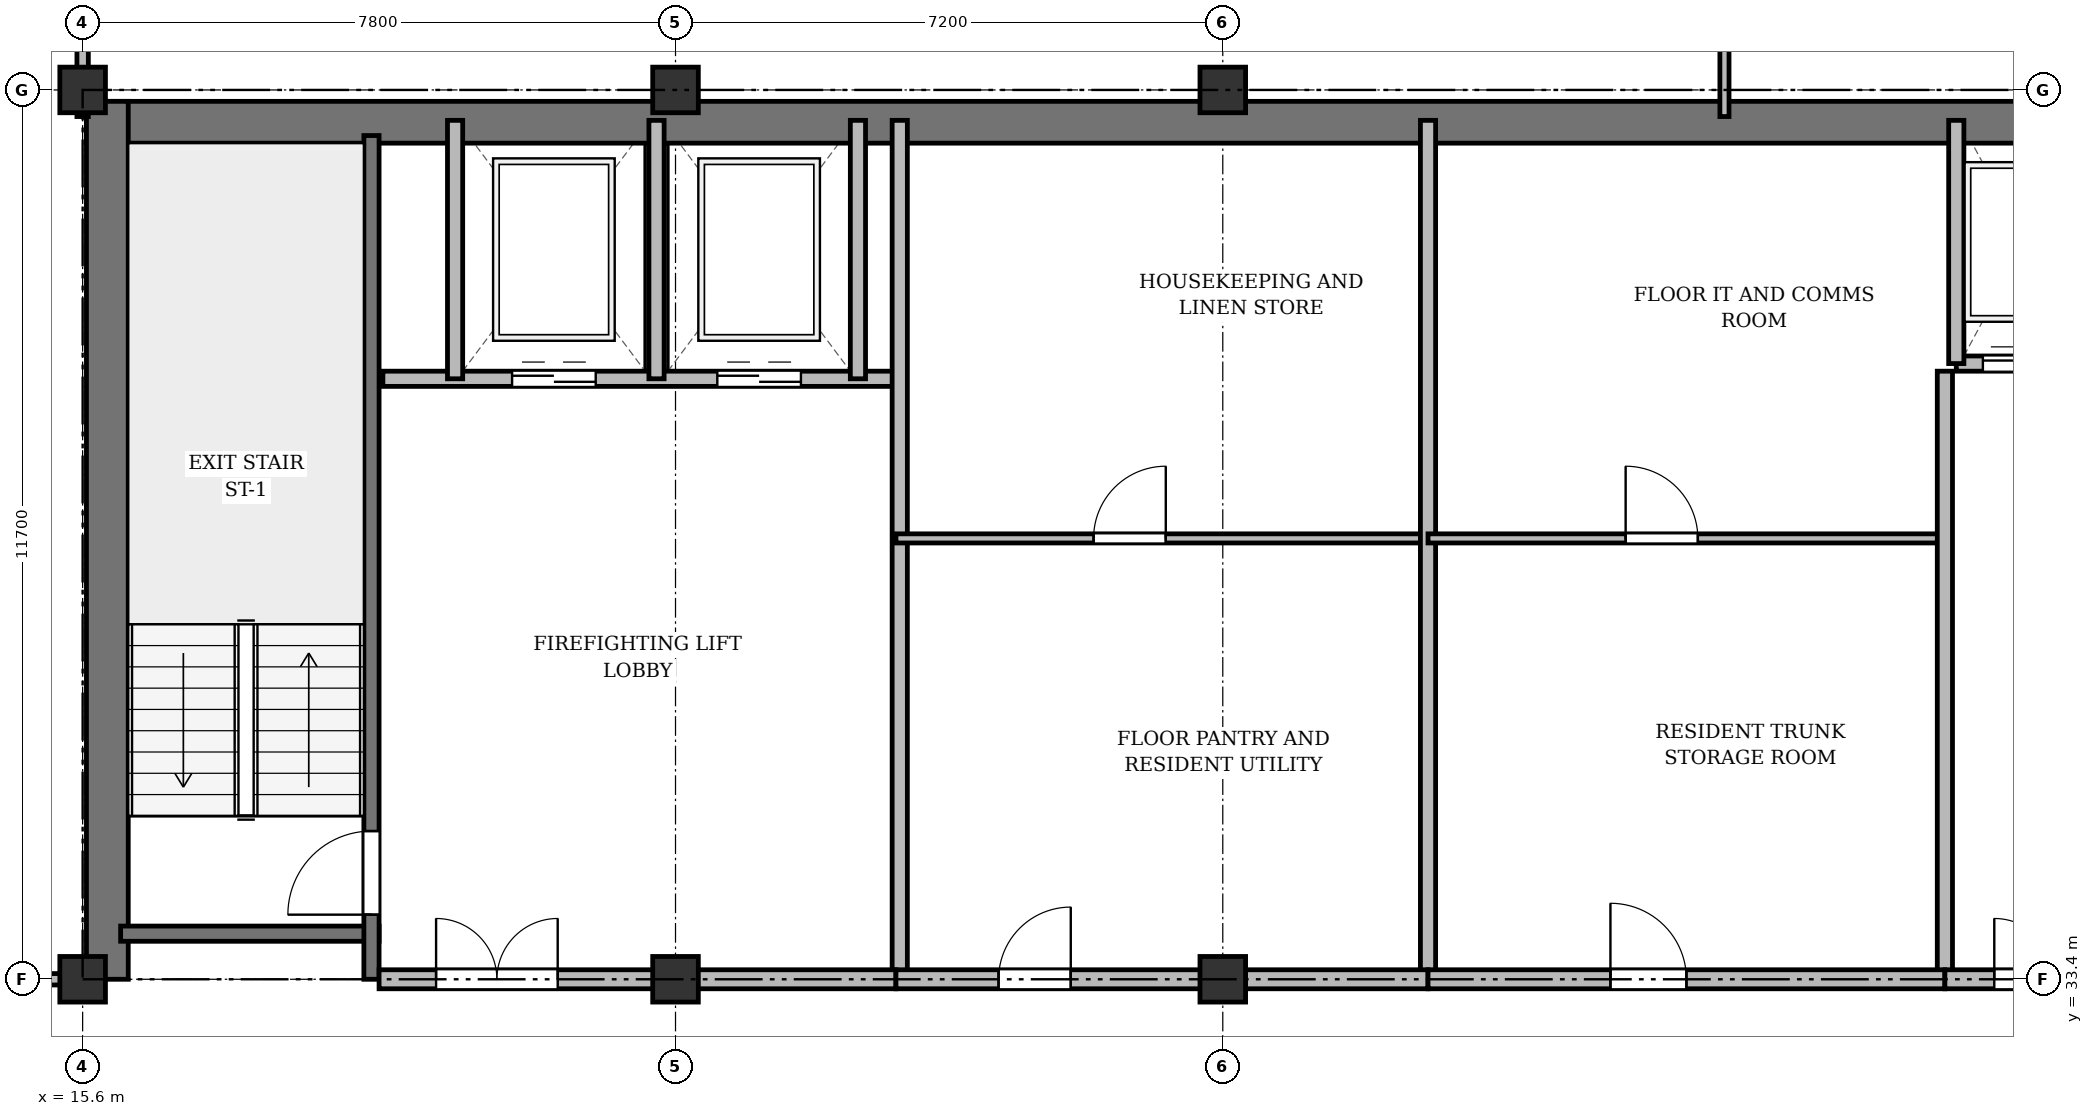
"""IFC4 building model, lengths in metres.
Left out: names, types, materials, properties, quantities, classifications, styles, units other than length and angle.
Written with IfcOpenShell. Run it as: python <this file> out.ifc"""

import sys

from ifc_helpers import new_model, si_unit, direction, frame, frame_2d, origin, origin_2d, place, context, subcontext, project, spatial, rectangle, extrude, source, transform, mapped, element, fill, save


model = new_model("IFC4")
c1 = context("Model", 3, precision=1e-05, world=origin(), true_north=direction((0.0, 1.0)))
c2 = subcontext(c1, "Body", "Model", "MODEL_VIEW")
j1 = project(units=[si_unit("LENGTHUNIT", "METRE"), si_unit("PLANEANGLEUNIT", "RADIAN")], contexts=[c1])
p1 = place(None, origin())
s1 = spatial("IfcSite", under=j1, at=p1, CompositionType="ELEMENT")
p2 = place(p1, origin())
s2 = spatial("IfcBuilding", under=s1, at=p2, CompositionType="ELEMENT")
p3 = place(p2, frame((0.0, 0.0, 288.3)))
s3 = spatial("IfcBuildingStorey", under=s2, at=p3, CompositionType="ELEMENT", Elevation=288.3)
m1 = source(origin(), c2, "Body", "SweptSolid", [
    extrude(rectangle(XDim=0.6, YDim=0.6, at=origin_2d()), origin(), (0.0, 0.0, 1.0), 3.6),
])
for number, where, z_axis, x_axis in (
    (1, (15.6, 33.4, 0.0), (0.0, 0.0, 1.0), (1.0, 0.0, 0.0)),
    (2, (15.6, 45.1, 0.0), (0.0, 0.0, 1.0), (1.0, 0.0, 0.0)),
    (3, (23.4, 33.4, 0.0), (0.0, 0.0, 1.0), (1.0, 0.0, 0.0)),
    (4, (23.4, 45.1, 0.0), (0.0, 0.0, 1.0), (1.0, 0.0, 0.0)),
    (5, (30.6, 33.4, 0.0), (0.0, 0.0, 1.0), (1.0, 0.0, 0.0)),
    (6, (30.6, 45.1, 0.0), (0.0, 0.0, 1.0), (1.0, 0.0, 0.0)),
):
    element("IfcColumn", number, at=place(p3, frame(where, z_axis=z_axis, x_axis=x_axis)), inside=s3, PredefinedType="COLUMN", context=c2, shape_type="MappedRepresentation", body=[
        mapped(m1, transform((0.0, 0.0, 0.0), x_axis=(1.0, 0.0, 0.0), y_axis=(0.0, 1.0, 0.0), z_axis=(0.0, 0.0, 1.0), scale=1.0)),
    ])
p4 = place(p3, frame((15.65, 44.675, 0.0), z_axis=(0.0, 0.0, 1.0), x_axis=(1.0, 0.0, 0.0)))
e7 = element("IfcWall", 7, at=p4, inside=s3, PredefinedType="SHEAR", context=c2, shape_type="SweptSolid", body=[
    extrude(rectangle(XDim=43.1, YDim=0.55, at=frame_2d((21.55, 0.0))), origin(), (0.0, 0.0, 1.0), 3.37),
])
p5 = place(p3, frame((15.925, 33.4, 0.0), z_axis=(0.0, 0.0, 1.0), x_axis=(0.0, 1.0, 0.0)))
e8 = element("IfcWall", 8, at=p5, inside=s3, PredefinedType="SHEAR", context=c2, shape_type="SweptSolid", body=[
    extrude(rectangle(XDim=11.55, YDim=0.55, at=frame_2d((5.775, 0.0))), origin(), (0.0, 0.0, 1.0), 3.37),
])
p6 = place(p3, frame((16.1, 34.0, 0.0), z_axis=(0.0, 0.0, 1.0), x_axis=(1.0, 0.0, 0.0)))
e9 = element("IfcWall", 9, at=p6, inside=s3, PredefinedType="SHEAR", context=c2, shape_type="SweptSolid", body=[
    extrude(rectangle(XDim=3.4, YDim=0.2, at=frame_2d((1.7, 0.0))), origin(), (0.0, 0.0, 1.0), 3.37),
])
p7 = place(p3, frame((19.4, 33.4, 0.0), z_axis=(0.0, 0.0, 1.0), x_axis=(0.0, 1.0, 0.0)))
e10 = element("IfcWall", 10, at=p7, inside=s3, PredefinedType="SHEAR", context=c2, shape_type="SweptSolid", body=[
    extrude(rectangle(XDim=11.1, YDim=0.2, at=frame_2d((5.55, 0.0))), origin(), (0.0, 0.0, 1.0), 3.37),
])
p8 = place(p7, frame((0.85, 0.0, 0.0)))
e11 = element("IfcOpeningElement", 11, at=p8, cuts=e10, PredefinedType="OPENING", context=c2, shape_type="SweptSolid", body=[
    extrude(rectangle(XDim=1.1, YDim=2.15, at=frame_2d((0.55, 1.075))), frame((0.0, 0.11, 0.0), z_axis=(0.0, -1.0, 0.0), x_axis=(1.0, 0.0, 0.0)), (0.0, 0.0, 1.0), 0.22),
])
p9 = place(p3, frame((19.55, 41.3, 0.0), z_axis=(0.0, 0.0, 1.0), x_axis=(1.0, 0.0, 0.0)))
e12 = element("IfcWall", 12, at=p9, inside=s3, PredefinedType="SOLIDWALL", context=c2, shape_type="SweptSolid", body=[
    extrude(rectangle(XDim=6.75, YDim=0.2, at=frame_2d((3.375, 0.0))), origin(), (0.0, 0.0, 1.0), 3.37),
])
p10 = place(p9, frame((1.7, 0.0, 0.0)))
e13 = element("IfcOpeningElement", 13, at=p10, cuts=e12, PredefinedType="OPENING", context=c2, shape_type="SweptSolid", body=[
    extrude(rectangle(XDim=1.1, YDim=2.15, at=frame_2d((0.55, 1.075))), frame((0.0, 0.11, 0.0), z_axis=(0.0, -1.0, 0.0), x_axis=(1.0, 0.0, 0.0)), (0.0, 0.0, 1.0), 0.22),
])
p11 = place(p9, frame((4.4, 0.0, 0.0)))
e14 = element("IfcOpeningElement", 14, at=p11, cuts=e12, PredefinedType="OPENING", context=c2, shape_type="SweptSolid", body=[
    extrude(rectangle(XDim=1.1, YDim=2.15, at=frame_2d((0.55, 1.075))), frame((0.0, 0.11, 0.0), z_axis=(0.0, -1.0, 0.0), x_axis=(1.0, 0.0, 0.0)), (0.0, 0.0, 1.0), 0.22),
])
for number, where, z_axis, x_axis in (
    (15, (20.5, 41.3, 0.0), (0.0, 0.0, 1.0), (0.0, 1.0, 0.0)),
    (16, (23.15, 41.3, 0.0), (0.0, 0.0, 1.0), (0.0, 1.0, 0.0)),
    (17, (25.8, 41.3, 0.0), (0.0, 0.0, 1.0), (0.0, 1.0, 0.0)),
):
    element("IfcWall", number, at=place(p3, frame(where, z_axis=z_axis, x_axis=x_axis)), inside=s3, PredefinedType="SOLIDWALL", context=c2, shape_type="SweptSolid", body=[
        extrude(rectangle(XDim=3.4, YDim=0.2, at=frame_2d((1.7, 0.0))), origin(), (0.0, 0.0, 1.0), 3.37),
    ])
p12 = place(p3, frame((26.35, 33.4, 0.0), z_axis=(0.0, 0.0, 1.0), x_axis=(0.0, 1.0, 0.0)))
e18 = element("IfcWall", 18, at=p12, inside=s3, PredefinedType="SOLIDWALL", context=c2, shape_type="SweptSolid", body=[
    extrude(rectangle(XDim=11.3, YDim=0.2, at=frame_2d((5.65, 0.0))), origin(), (0.0, 0.0, 1.0), 2.92),
])
p13 = place(p3, frame((19.5, 33.4, 0.0), z_axis=(0.0, 0.0, 1.0), x_axis=(1.0, 0.0, 0.0)))
e19 = element("IfcWall", 19, at=p13, inside=s3, PredefinedType="PARTITIONING", context=c2, shape_type="SweptSolid", body=[
    extrude(rectangle(XDim=6.8, YDim=0.25, at=frame_2d((3.4, 0.0))), origin(), (0.0, 0.0, 1.0), 2.92),
])
p14 = place(p13, frame((0.75, 0.0, 0.0)))
e20 = element("IfcOpeningElement", 20, at=p14, cuts=e19, PredefinedType="OPENING", context=c2, shape_type="SweptSolid", body=[
    extrude(rectangle(XDim=1.6, YDim=2.2, at=frame_2d((0.8, 1.1))), frame((0.0, 0.135, 0.0), z_axis=(0.0, -1.0, 0.0), x_axis=(1.0, 0.0, 0.0)), (0.0, 0.0, 1.0), 0.27),
])
p15 = place(p3, frame((26.3, 39.2, 0.0), z_axis=(0.0, 0.0, 1.0), x_axis=(1.0, 0.0, 0.0)))
e21 = element("IfcWall", 21, at=p15, inside=s3, PredefinedType="PARTITIONING", context=c2, shape_type="SweptSolid", body=[
    extrude(rectangle(XDim=7.0, YDim=0.12, at=frame_2d((3.5, 0.0))), origin(), (0.0, 0.0, 1.0), 2.87),
])
p16 = place(p15, frame((2.6, 0.0, 0.0)))
e22 = element("IfcOpeningElement", 22, at=p16, cuts=e21, PredefinedType="OPENING", context=c2, shape_type="SweptSolid", body=[
    extrude(rectangle(XDim=0.95, YDim=2.15, at=frame_2d((0.475, 1.075))), frame((0.0, 0.07, 0.0), z_axis=(0.0, -1.0, 0.0), x_axis=(1.0, 0.0, 0.0)), (0.0, 0.0, 1.0), 0.14),
])
p17 = place(p3, frame((33.3, 33.4, 0.0), z_axis=(0.0, 0.0, 1.0), x_axis=(0.0, 1.0, 0.0)))
e23 = element("IfcWall", 23, at=p17, inside=s3, PredefinedType="SOLIDWALL", context=c2, shape_type="SweptSolid", body=[
    extrude(rectangle(XDim=11.3, YDim=0.2, at=frame_2d((5.65, 0.0))), origin(), (0.0, 0.0, 1.0), 2.92),
])
p18 = place(p3, frame((33.3, 39.2, 0.0), z_axis=(0.0, 0.0, 1.0), x_axis=(1.0, 0.0, 0.0)))
e24 = element("IfcWall", 24, at=p18, inside=s3, PredefinedType="PARTITIONING", context=c2, shape_type="SweptSolid", body=[
    extrude(rectangle(XDim=6.8, YDim=0.12, at=frame_2d((3.4, 0.0))), origin(), (0.0, 0.0, 1.0), 3.37),
])
p19 = place(p18, frame((2.6, 0.0, 0.0)))
e25 = element("IfcOpeningElement", 25, at=p19, cuts=e24, PredefinedType="OPENING", context=c2, shape_type="SweptSolid", body=[
    extrude(rectangle(XDim=0.95, YDim=2.15, at=frame_2d((0.475, 1.075))), frame((0.0, 0.07, 0.0), z_axis=(0.0, -1.0, 0.0), x_axis=(1.0, 0.0, 0.0)), (0.0, 0.0, 1.0), 0.14),
])
p20 = place(p3, frame((40.1, 33.4, 0.0), z_axis=(0.0, 0.0, 1.0), x_axis=(0.0, 1.0, 0.0)))
e26 = element("IfcWall", 26, at=p20, inside=s3, PredefinedType="SOLIDWALL", context=c2, shape_type="SweptSolid", body=[
    extrude(rectangle(XDim=8.0, YDim=0.2, at=frame_2d((4.0, 0.0))), origin(), (0.0, 0.0, 1.0), 2.92),
])
p21 = place(p3, frame((40.25, 41.5, 0.0), z_axis=(0.0, 0.0, 1.0), x_axis=(1.0, 0.0, 0.0)))
e27 = element("IfcWall", 27, at=p21, inside=s3, PredefinedType="SOLIDWALL", context=c2, shape_type="SweptSolid", body=[
    extrude(rectangle(XDim=6.9, YDim=0.2, at=frame_2d((3.45, 0.0))), origin(), (0.0, 0.0, 1.0), 3.37),
])
p22 = place(p21, frame((0.35, 0.0, 0.0)))
e28 = element("IfcOpeningElement", 28, at=p22, cuts=e27, PredefinedType="OPENING", context=c2, shape_type="SweptSolid", body=[
    extrude(rectangle(XDim=1.05, YDim=2.15, at=frame_2d((0.525, 1.075))), frame((0.0, 0.11, 0.0), z_axis=(0.0, -1.0, 0.0), x_axis=(1.0, 0.0, 0.0)), (0.0, 0.0, 1.0), 0.22),
])
p23 = place(p21, frame((2.05, 0.0, 0.0)))
e29 = element("IfcOpeningElement", 29, at=p23, cuts=e27, PredefinedType="OPENING", context=c2, shape_type="SweptSolid", body=[
    extrude(rectangle(XDim=1.05, YDim=2.15, at=frame_2d((0.525, 1.075))), frame((0.0, 0.11, 0.0), z_axis=(0.0, -1.0, 0.0), x_axis=(1.0, 0.0, 0.0)), (0.0, 0.0, 1.0), 0.22),
])
p24 = place(p21, frame((3.75, 0.0, 0.0)))
e30 = element("IfcOpeningElement", 30, at=p24, cuts=e27, PredefinedType="OPENING", context=c2, shape_type="SweptSolid", body=[
    extrude(rectangle(XDim=1.05, YDim=2.15, at=frame_2d((0.525, 1.075))), frame((0.0, 0.11, 0.0), z_axis=(0.0, -1.0, 0.0), x_axis=(1.0, 0.0, 0.0)), (0.0, 0.0, 1.0), 0.22),
])
p25 = place(p21, frame((5.45, 0.0, 0.0)))
e31 = element("IfcOpeningElement", 31, at=p25, cuts=e27, PredefinedType="OPENING", context=c2, shape_type="SweptSolid", body=[
    extrude(rectangle(XDim=1.05, YDim=2.15, at=frame_2d((0.525, 1.075))), frame((0.0, 0.11, 0.0), z_axis=(0.0, -1.0, 0.0), x_axis=(1.0, 0.0, 0.0)), (0.0, 0.0, 1.0), 0.22),
])
p26 = place(p3, frame((40.25, 41.5, 0.0), z_axis=(0.0, 0.0, 1.0), x_axis=(0.0, 1.0, 0.0)))
e32 = element("IfcWall", 32, at=p26, inside=s3, PredefinedType="SOLIDWALL", context=c2, shape_type="SweptSolid", body=[
    extrude(rectangle(XDim=3.2, YDim=0.2, at=frame_2d((1.6, 0.0))), origin(), (0.0, 0.0, 1.0), 3.37),
])
p27 = place(p3, frame((26.3, 33.4, 0.0), z_axis=(0.0, 0.0, 1.0), x_axis=(1.0, 0.0, 0.0)))
e33 = element("IfcWall", 33, at=p27, inside=s3, PredefinedType="PARTITIONING", context=c2, shape_type="SweptSolid", body=[
    extrude(rectangle(XDim=7.0, YDim=0.25, at=frame_2d((3.5, 0.0))), origin(), (0.0, 0.0, 1.0), 2.92),
])
p28 = place(p27, frame((1.35, 0.0, 0.0)))
e34 = element("IfcOpeningElement", 34, at=p28, cuts=e33, PredefinedType="OPENING", context=c2, shape_type="SweptSolid", body=[
    extrude(rectangle(XDim=0.95, YDim=2.15, at=frame_2d((0.475, 1.075))), frame((0.0, 0.135, 0.0), z_axis=(0.0, -1.0, 0.0), x_axis=(1.0, 0.0, 0.0)), (0.0, 0.0, 1.0), 0.27),
])
p29 = place(p3, frame((33.3, 33.4, 0.0), z_axis=(0.0, 0.0, 1.0), x_axis=(1.0, 0.0, 0.0)))
e35 = element("IfcWall", 35, at=p29, inside=s3, PredefinedType="PARTITIONING", context=c2, shape_type="SweptSolid", body=[
    extrude(rectangle(XDim=6.8, YDim=0.25, at=frame_2d((3.4, 0.0))), origin(), (0.0, 0.0, 1.0), 2.92),
])
p30 = place(p29, frame((2.4, 0.0, 0.0)))
e36 = element("IfcOpeningElement", 36, at=p30, cuts=e35, PredefinedType="OPENING", context=c2, shape_type="SweptSolid", body=[
    extrude(rectangle(XDim=1.0, YDim=2.15, at=frame_2d((0.5, 1.075))), frame((0.0, 0.135, 0.0), z_axis=(0.0, -1.0, 0.0), x_axis=(1.0, 0.0, 0.0)), (0.0, 0.0, 1.0), 0.27),
])
p31 = place(p3, frame((40.1, 33.4, 0.0), z_axis=(0.0, 0.0, 1.0), x_axis=(1.0, 0.0, 0.0)))
e37 = element("IfcWall", 37, at=p31, inside=s3, PredefinedType="PARTITIONING", context=c2, shape_type="SweptSolid", body=[
    extrude(rectangle(XDim=7.05, YDim=0.25, at=frame_2d((3.525, 0.0))), origin(), (0.0, 0.0, 1.0), 2.92),
])
p32 = place(p31, frame((0.65, 0.0, 0.0)))
e38 = element("IfcOpeningElement", 38, at=p32, cuts=e37, PredefinedType="OPENING", context=c2, shape_type="SweptSolid", body=[
    extrude(rectangle(XDim=1.6, YDim=2.2, at=frame_2d((0.8, 1.1))), frame((0.0, 0.135, 0.0), z_axis=(0.0, -1.0, 0.0), x_axis=(1.0, 0.0, 0.0)), (0.0, 0.0, 1.0), 0.27),
])
p33 = place(p3, frame((8.45, 33.4, 0.0), z_axis=(0.0, 0.0, 1.0), x_axis=(1.0, 0.0, 0.0)))
e39 = element("IfcWall", 39, at=p33, inside=s3, PredefinedType="PARTITIONING", context=c2, shape_type="SweptSolid", body=[
    extrude(rectangle(XDim=7.15, YDim=0.15, at=frame_2d((3.575, 0.0))), origin(), (0.0, 0.0, 1.0), 2.92),
])
p34 = place(p33, frame((3.0, 0.0, 0.0)))
e40 = element("IfcOpeningElement", 40, at=p34, cuts=e39, PredefinedType="OPENING", context=c2, shape_type="SweptSolid", body=[
    extrude(rectangle(XDim=0.95, YDim=2.15, at=frame_2d((0.475, 1.075))), frame((0.0, 0.085, 0.0), z_axis=(0.0, -1.0, 0.0), x_axis=(1.0, 0.0, 0.0)), (0.0, 0.0, 1.0), 0.17),
])
p35 = place(p3, frame((37.2, 44.75, 0.0), z_axis=(0.0, 0.0, 1.0), x_axis=(0.0, 1.0, 0.0)))
e41 = element("IfcWall", 41, at=p35, inside=s3, PredefinedType="PARTITIONING", context=c2, shape_type="SweptSolid", body=[
    extrude(rectangle(XDim=3.61, YDim=0.12, at=frame_2d((1.805, 0.0))), origin(), (0.0, 0.0, 1.0), 2.92),
])
p36 = place(p35, frame((1.1, 0.0, 0.0)))
e42 = element("IfcOpeningElement", 42, at=p36, cuts=e41, PredefinedType="OPENING", context=c2, shape_type="SweptSolid", body=[
    extrude(rectangle(XDim=0.95, YDim=2.15, at=frame_2d((0.475, 1.075))), frame((0.0, 0.07, 0.0), z_axis=(0.0, -1.0, 0.0), x_axis=(1.0, 0.0, 0.0)), (0.0, 0.0, 1.0), 0.14),
])
p37 = place(p3, frame((15.6, 44.75, 0.0), z_axis=(0.0, 0.0, 1.0), x_axis=(0.0, 1.0, 0.0)))
e43 = element("IfcWall", 43, at=p37, inside=s3, PredefinedType="PARTITIONING", context=c2, shape_type="SweptSolid", body=[
    extrude(rectangle(XDim=3.61, YDim=0.15, at=frame_2d((1.805, 0.0))), origin(), (0.0, 0.0, 1.0), 2.87),
])
p38 = place(p37, frame((1.1, 0.0, 0.0)))
e44 = element("IfcOpeningElement", 44, at=p38, cuts=e43, PredefinedType="OPENING", context=c2, shape_type="SweptSolid", body=[
    extrude(rectangle(XDim=0.95, YDim=2.15, at=frame_2d((0.475, 1.075))), frame((0.0, 0.085, 0.0), z_axis=(0.0, -1.0, 0.0), x_axis=(1.0, 0.0, 0.0)), (0.0, 0.0, 1.0), 0.17),
])
m2 = source(origin(), c2, "Body", "SweptSolid", [
    extrude(rectangle(XDim=1.1, YDim=2.15, at=frame_2d((0.55, 1.075))), frame((0.0, 0.025, 0.0), z_axis=(0.0, -1.0, 0.0), x_axis=(1.0, 0.0, 0.0)), (0.0, 0.0, 1.0), 0.05),
])
p39 = place(p8, origin())
e45 = element("IfcDoor", 45, at=p39, inside=s3, OperationType="SINGLE_SWING_LEFT", PredefinedType="DOOR", context=c2, shape_type="MappedRepresentation", body=[
    mapped(m2, transform((0.0, 0.0, 0.0), x_axis=(1.0, 0.0, 0.0), y_axis=(0.0, 1.0, 0.0), z_axis=(0.0, 0.0, 1.0), scale=1.0)),
])
fill(e11, e45)
p40 = place(p10, origin())
e46 = element("IfcDoor", 46, at=p40, inside=s3, OperationType="DOUBLE_DOOR_SLIDING", PredefinedType="DOOR", context=c2, shape_type="MappedRepresentation", body=[
    mapped(m2, transform((0.0, 0.0, 0.0), x_axis=(1.0, 0.0, 0.0), y_axis=(0.0, 1.0, 0.0), z_axis=(0.0, 0.0, 1.0), scale=1.0)),
])
fill(e13, e46)
p41 = place(p11, origin())
e47 = element("IfcDoor", 47, at=p41, inside=s3, OperationType="DOUBLE_DOOR_SLIDING", PredefinedType="DOOR", context=c2, shape_type="MappedRepresentation", body=[
    mapped(m2, transform((0.0, 0.0, 0.0), x_axis=(1.0, 0.0, 0.0), y_axis=(0.0, 1.0, 0.0), z_axis=(0.0, 0.0, 1.0), scale=1.0)),
])
fill(e14, e47)
m3 = source(origin(), c2, "Body", "SweptSolid", [
    extrude(rectangle(XDim=1.6, YDim=2.2, at=frame_2d((0.8, 1.1))), frame((0.0, 0.025, 0.0), z_axis=(0.0, -1.0, 0.0), x_axis=(1.0, 0.0, 0.0)), (0.0, 0.0, 1.0), 0.05),
])
p42 = place(p14, origin())
e48 = element("IfcDoor", 48, at=p42, inside=s3, OperationType="DOUBLE_DOOR_SINGLE_SWING", PredefinedType="DOOR", context=c2, shape_type="MappedRepresentation", body=[
    mapped(m3, transform((0.0, 0.0, 0.0), x_axis=(1.0, 0.0, 0.0), y_axis=(0.0, 1.0, 0.0), z_axis=(0.0, 0.0, 1.0), scale=1.0)),
])
fill(e20, e48)
m4 = source(origin(), c2, "Body", "SweptSolid", [
    extrude(rectangle(XDim=0.95, YDim=2.15, at=frame_2d((0.475, 1.075))), frame((0.0, 0.025, 0.0), z_axis=(0.0, -1.0, 0.0), x_axis=(1.0, 0.0, 0.0)), (0.0, 0.0, 1.0), 0.05),
])
p43 = place(p16, origin())
e49 = element("IfcDoor", 49, at=p43, inside=s3, OperationType="SINGLE_SWING_RIGHT", PredefinedType="DOOR", context=c2, shape_type="MappedRepresentation", body=[
    mapped(m4, transform((0.0, 0.0, 0.0), x_axis=(1.0, 0.0, 0.0), y_axis=(0.0, 1.0, 0.0), z_axis=(0.0, 0.0, 1.0), scale=1.0)),
])
fill(e22, e49)
p44 = place(p19, origin())
e50 = element("IfcDoor", 50, at=p44, inside=s3, OperationType="SINGLE_SWING_LEFT", PredefinedType="DOOR", context=c2, shape_type="MappedRepresentation", body=[
    mapped(m4, transform((0.0, 0.0, 0.0), x_axis=(1.0, 0.0, 0.0), y_axis=(0.0, 1.0, 0.0), z_axis=(0.0, 0.0, 1.0), scale=1.0)),
])
fill(e25, e50)
m5 = source(origin(), c2, "Body", "SweptSolid", [
    extrude(rectangle(XDim=1.05, YDim=2.15, at=frame_2d((0.525, 1.075))), frame((0.0, 0.025, 0.0), z_axis=(0.0, -1.0, 0.0), x_axis=(1.0, 0.0, 0.0)), (0.0, 0.0, 1.0), 0.05),
])
p45 = place(p22, origin())
e51 = element("IfcDoor", 51, at=p45, inside=s3, OperationType="DOUBLE_DOOR_SLIDING", PredefinedType="DOOR", context=c2, shape_type="MappedRepresentation", body=[
    mapped(m5, transform((0.0, 0.0, 0.0), x_axis=(1.0, 0.0, 0.0), y_axis=(0.0, 1.0, 0.0), z_axis=(0.0, 0.0, 1.0), scale=1.0)),
])
fill(e28, e51)
p46 = place(p28, origin())
e52 = element("IfcDoor", 52, at=p46, inside=s3, OperationType="SINGLE_SWING_RIGHT", PredefinedType="DOOR", context=c2, shape_type="MappedRepresentation", body=[
    mapped(m4, transform((0.0, 0.0, 0.0), x_axis=(1.0, 0.0, 0.0), y_axis=(0.0, 1.0, 0.0), z_axis=(0.0, 0.0, 1.0), scale=1.0)),
])
fill(e34, e52)
m6 = source(origin(), c2, "Body", "SweptSolid", [
    extrude(rectangle(XDim=1.0, YDim=2.15, at=frame_2d((0.5, 1.075))), frame((0.0, 0.025, 0.0), z_axis=(0.0, -1.0, 0.0), x_axis=(1.0, 0.0, 0.0)), (0.0, 0.0, 1.0), 0.05),
])
p47 = place(p30, origin())
e53 = element("IfcDoor", 53, at=p47, inside=s3, OperationType="SINGLE_SWING_LEFT", PredefinedType="DOOR", context=c2, shape_type="MappedRepresentation", body=[
    mapped(m6, transform((0.0, 0.0, 0.0), x_axis=(1.0, 0.0, 0.0), y_axis=(0.0, 1.0, 0.0), z_axis=(0.0, 0.0, 1.0), scale=1.0)),
])
fill(e36, e53)
p48 = place(p32, origin())
e54 = element("IfcDoor", 54, at=p48, inside=s3, OperationType="DOUBLE_DOOR_SINGLE_SWING", PredefinedType="DOOR", context=c2, shape_type="MappedRepresentation", body=[
    mapped(m3, transform((0.0, 0.0, 0.0), x_axis=(1.0, 0.0, 0.0), y_axis=(0.0, 1.0, 0.0), z_axis=(0.0, 0.0, 1.0), scale=1.0)),
])
fill(e38, e54)
save(model, sys.argv[1])
